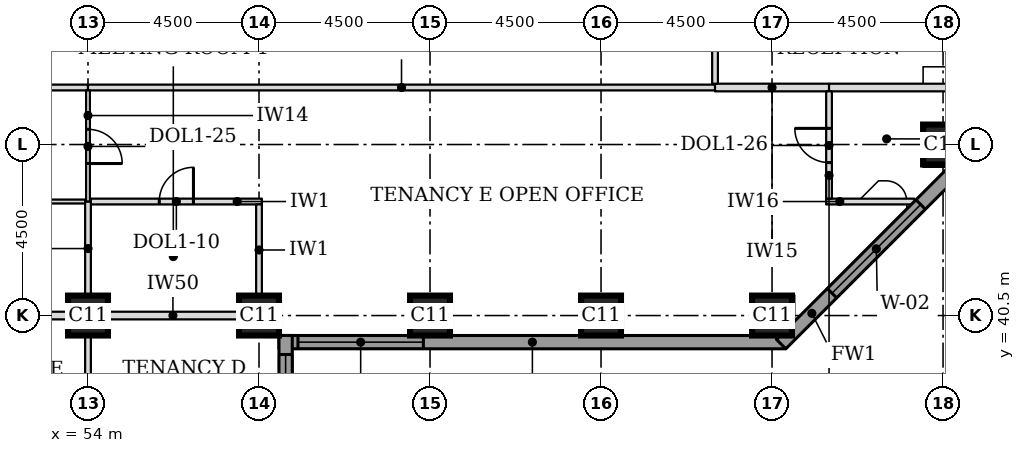
"""IFC4 building model, lengths in metres.
Left out: names, types, materials, properties, quantities, classifications, styles, units other than length and angle.
Written with IfcOpenShell. Run it as: python <this file> out.ifc"""

import sys

from ifc_helpers import new_model, si_unit, direction, frame, frame_2d, origin, origin_2d, place, context, subcontext, project, spatial, rectangle, extrude, element, fill, save


model = new_model("IFC4")
c1 = context("Model", 3, precision=1e-05, world=origin(), true_north=direction((0.0, 1.0)))
c2 = subcontext(c1, "Body", "Model", "MODEL_VIEW")
j1 = project(units=[si_unit("LENGTHUNIT", "METRE"), si_unit("PLANEANGLEUNIT", "RADIAN")], contexts=[c1])
p1 = place(None, origin())
s1 = spatial("IfcSite", under=j1, at=p1, CompositionType="ELEMENT")
p2 = place(p1, origin())
s2 = spatial("IfcBuilding", under=s1, at=p2, CompositionType="ELEMENT")
p3 = place(p2, frame((0.0, 0.0, 78.9)))
s3 = spatial("IfcBuildingStorey", under=s2, at=p3, CompositionType="ELEMENT", Elevation=78.9)
for number, where, z_axis, x_axis in (
    (1, (54.0, 40.5, 0.0), (0.0, 0.0, 1.0), (1.0, 0.0, 0.0)),
    (2, (58.5, 40.5, 0.0), (0.0, 0.0, 1.0), (1.0, 0.0, 0.0)),
    (3, (63.0, 40.5, 0.0), (0.0, 0.0, 1.0), (1.0, 0.0, 0.0)),
    (4, (67.5, 40.5, 0.0), (0.0, 0.0, 1.0), (1.0, 0.0, 0.0)),
    (5, (72.0, 40.5, 0.0), (0.0, 0.0, 1.0), (1.0, 0.0, 0.0)),
    (6, (76.5, 45.0, 0.0), (0.0, 0.0, 1.0), (1.0, 0.0, 0.0)),
):
    element("IfcColumn", number, at=place(p3, frame(where, z_axis=z_axis, x_axis=x_axis)), inside=s3, PredefinedType="COLUMN", context=c2, shape_type="SweptSolid", body=[
        extrude(rectangle(XDim=1.05, YDim=1.05, at=origin_2d()), origin(), (0.0, 0.0, 1.0), 3.7),
    ])
p4 = place(p3, frame((59.025, 39.8, 0.0), z_axis=(0.0, 0.0, 1.0), x_axis=(1.0, 0.0, 0.0)))
e7 = element("IfcWall", 7, at=p4, inside=s3, PredefinedType="STANDARD", context=c2, shape_type="SweptSolid", body=[
    extrude(rectangle(XDim=13.337, YDim=0.35, at=frame_2d((6.669, 0.0))), origin(), (0.0, 0.0, 1.0), 3.525),
])
p5 = place(p4, frame((0.5, 0.0, 0.9)))
e8 = element("IfcOpeningElement", 8, at=p5, cuts=e7, PredefinedType="OPENING", context=c2, shape_type="SweptSolid", body=[
    extrude(rectangle(XDim=3.3, YDim=1.9, at=frame_2d((1.65, 0.95))), frame((0.0, 0.185, 0.0), z_axis=(0.0, -1.0, 0.0), x_axis=(1.0, 0.0, 0.0)), (0.0, 0.0, 1.0), 0.37),
])
p6 = place(p3, frame((72.239, 39.749, 0.0), z_axis=(0.0, 0.0, 1.0), x_axis=(0.707106781187, 0.707106781187, 0.0)))
e9 = element("IfcWall", 9, at=p6, inside=s3, PredefinedType="STANDARD", context=c2, shape_type="SweptSolid", body=[
    extrude(rectangle(XDim=7.089, YDim=0.35, at=frame_2d((3.544, 0.0))), origin(), (0.0, 0.0, 1.0), 3.525),
])
p7 = place(p6, frame((1.894, 0.0, 0.9)))
e10 = element("IfcOpeningElement", 10, at=p7, cuts=e9, PredefinedType="OPENING", context=c2, shape_type="SweptSolid", body=[
    extrude(rectangle(XDim=3.3, YDim=1.9, at=frame_2d((1.65, 0.95))), frame((0.0, 0.185, 0.0), z_axis=(0.0, -1.0, 0.0), x_axis=(1.0, 0.0, 0.0)), (0.0, 0.0, 1.0), 0.37),
])
p8 = place(p3, frame((59.2, 22.138, 0.0), z_axis=(0.0, 0.0, 1.0), x_axis=(0.0, 1.0, 0.0)))
e11 = element("IfcWall", 11, at=p8, inside=s3, PredefinedType="STANDARD", context=c2, shape_type="SweptSolid", body=[
    extrude(rectangle(XDim=17.837, YDim=0.35, at=frame_2d((8.919, 0.0))), origin(), (0.0, 0.0, 1.0), 3.525),
])
p9 = place(p8, frame((5.462, 0.0, 0.9)))
e12 = element("IfcOpeningElement", 12, at=p9, cuts=e11, PredefinedType="OPENING", context=c2, shape_type="SweptSolid", body=[
    extrude(rectangle(XDim=3.3, YDim=1.9, at=frame_2d((1.65, 0.95))), frame((0.0, 0.185, 0.0), z_axis=(0.0, -1.0, 0.0), x_axis=(1.0, 0.0, 0.0)), (0.0, 0.0, 1.0), 0.37),
])
p10 = place(p8, frame((14.037, 0.0, 0.9)))
e13 = element("IfcOpeningElement", 13, at=p10, cuts=e11, PredefinedType="OPENING", context=c2, shape_type="SweptSolid", body=[
    extrude(rectangle(XDim=3.3, YDim=1.9, at=frame_2d((1.65, 0.95))), frame((0.0, 0.185, 0.0), z_axis=(0.0, -1.0, 0.0), x_axis=(1.0, 0.0, 0.0)), (0.0, 0.0, 1.0), 0.37),
])
p11 = place(p3, frame((50.015, 40.5, 0.0), z_axis=(0.0, 0.0, 1.0), x_axis=(1.0, 0.0, 0.0)))
e14 = element("IfcWall", 14, at=p11, inside=s3, PredefinedType="PARTITIONING", context=c2, shape_type="SweptSolid", body=[
    extrude(rectangle(XDim=3.46, YDim=0.2, at=frame_2d((1.73, 0.0))), origin(), (0.0, 0.0, 1.0), 2.8),
])
p12 = place(p3, frame((54.495, 40.5, 0.0), z_axis=(0.0, 0.0, 1.0), x_axis=(1.0, 0.0, 0.0)))
e15 = element("IfcWall", 15, at=p12, inside=s3, PredefinedType="PARTITIONING", context=c2, shape_type="SweptSolid", body=[
    extrude(rectangle(XDim=3.48, YDim=0.2, at=frame_2d((1.74, 0.0))), origin(), (0.0, 0.0, 1.0), 2.8),
])
p13 = place(p3, frame((49.575, 43.5, 0.0), z_axis=(0.0, 0.0, 1.0), x_axis=(1.0, 0.0, 0.0)))
e16 = element("IfcWall", 16, at=p13, inside=s3, PredefinedType="PARTITIONING", context=c2, shape_type="SweptSolid", body=[
    extrude(rectangle(XDim=4.35, YDim=0.1, at=frame_2d((2.175, 0.0))), origin(), (0.0, 0.0, 1.0), 3.55),
])
p14 = place(p13, frame((1.7, 0.0, 0.0)))
e17 = element("IfcOpeningElement", 17, at=p14, cuts=e16, PredefinedType="OPENING", context=c2, shape_type="SweptSolid", body=[
    extrude(rectangle(XDim=0.9, YDim=2.1, at=frame_2d((0.45, 1.05))), frame((0.0, 0.06, 0.0), z_axis=(0.0, -1.0, 0.0), x_axis=(1.0, 0.0, 0.0)), (0.0, 0.0, 1.0), 0.12),
])
p15 = place(p3, frame((54.075, 43.5, 0.0), z_axis=(0.0, 0.0, 1.0), x_axis=(1.0, 0.0, 0.0)))
e18 = element("IfcWall", 18, at=p15, inside=s3, PredefinedType="PARTITIONING", context=c2, shape_type="SweptSolid", body=[
    extrude(rectangle(XDim=4.5, YDim=0.15, at=frame_2d((2.25, 0.0))), origin(), (0.0, 0.0, 1.0), 3.55),
])
p16 = place(p15, frame((1.8, 0.0, 0.0)))
e19 = element("IfcOpeningElement", 19, at=p16, cuts=e18, PredefinedType="OPENING", context=c2, shape_type="SweptSolid", body=[
    extrude(rectangle(XDim=0.9, YDim=2.1, at=frame_2d((0.45, 1.05))), frame((0.0, 0.085, 0.0), z_axis=(0.0, -1.0, 0.0), x_axis=(1.0, 0.0, 0.0)), (0.0, 0.0, 1.0), 0.17),
])
p17 = place(p3, frame((73.425, 43.5, 0.0), z_axis=(0.0, 0.0, 1.0), x_axis=(1.0, 0.0, 0.0)))
e20 = element("IfcWall", 20, at=p17, inside=s3, PredefinedType="PARTITIONING", context=c2, shape_type="SweptSolid", body=[
    extrude(rectangle(XDim=2.317, YDim=0.15, at=frame_2d((1.159, 0.0))), origin(), (0.0, 0.0, 1.0), 3.55),
])
p18 = place(p3, frame((49.425, 46.5, 0.0), z_axis=(0.0, 0.0, 1.0), x_axis=(1.0, 0.0, 0.0)))
e21 = element("IfcWall", 21, at=p18, inside=s3, PredefinedType="PARTITIONING", context=c2, shape_type="SweptSolid", body=[
    extrude(rectangle(XDim=4.575, YDim=0.15, at=frame_2d((2.288, 0.0))), origin(), (0.0, 0.0, 1.0), 3.55),
])
p19 = place(p18, frame((1.8, 0.0, 0.0)))
e22 = element("IfcOpeningElement", 22, at=p19, cuts=e21, PredefinedType="OPENING", context=c2, shape_type="SweptSolid", body=[
    extrude(rectangle(XDim=1.0, YDim=2.1, at=frame_2d((0.5, 1.05))), frame((0.0, 0.085, 0.0), z_axis=(0.0, -1.0, 0.0), x_axis=(1.0, 0.0, 0.0)), (0.0, 0.0, 1.0), 0.17),
])
p20 = place(p3, frame((54.0, 46.5, 0.0), z_axis=(0.0, 0.0, 1.0), x_axis=(1.0, 0.0, 0.0)))
e23 = element("IfcWall", 23, at=p20, inside=s3, PredefinedType="PARTITIONING", context=c2, shape_type="SweptSolid", body=[
    extrude(rectangle(XDim=16.5, YDim=0.15, at=frame_2d((8.25, 0.0))), origin(), (0.0, 0.0, 1.0), 3.55),
])
p21 = place(p3, frame((70.5, 46.5, 0.0), z_axis=(0.0, 0.0, 1.0), x_axis=(1.0, 0.0, 0.0)))
e24 = element("IfcWall", 24, at=p21, inside=s3, PredefinedType="PARTITIONING", context=c2, shape_type="SweptSolid", body=[
    extrude(rectangle(XDim=3.0, YDim=0.2, at=frame_2d((1.5, 0.0))), origin(), (0.0, 0.0, 1.0), 3.55),
])
p22 = place(p3, frame((73.5, 46.5, 0.0), z_axis=(0.0, 0.0, 1.0), x_axis=(1.0, 0.0, 0.0)))
e25 = element("IfcWall", 25, at=p22, inside=s3, PredefinedType="PARTITIONING", context=c2, shape_type="SweptSolid", body=[
    extrude(rectangle(XDim=3.525, YDim=0.2, at=frame_2d((1.762, 0.0))), origin(), (0.0, 0.0, 1.0), 3.55),
])
p23 = place(p3, frame((54.0, 36.075, 0.0), z_axis=(0.0, 0.0, 1.0), x_axis=(0.0, 1.0, 0.0)))
e26 = element("IfcWall", 26, at=p23, inside=s3, PredefinedType="PARTITIONING", context=c2, shape_type="SweptSolid", body=[
    extrude(rectangle(XDim=3.9, YDim=0.15, at=frame_2d((1.95, 0.0))), origin(), (0.0, 0.0, 1.0), 3.55),
])
p24 = place(p3, frame((54.0, 41.025, 0.0), z_axis=(0.0, 0.0, 1.0), x_axis=(0.0, 1.0, 0.0)))
e27 = element("IfcWall", 27, at=p24, inside=s3, PredefinedType="PARTITIONING", context=c2, shape_type="SweptSolid", body=[
    extrude(rectangle(XDim=2.475, YDim=0.15, at=frame_2d((1.238, 0.0))), origin(), (0.0, 0.0, 1.0), 3.55),
])
p25 = place(p3, frame((58.5, 41.025, 0.0), z_axis=(0.0, 0.0, 1.0), x_axis=(0.0, 1.0, 0.0)))
e28 = element("IfcWall", 28, at=p25, inside=s3, PredefinedType="PARTITIONING", context=c2, shape_type="SweptSolid", body=[
    extrude(rectangle(XDim=2.4, YDim=0.15, at=frame_2d((1.2, 0.0))), origin(), (0.0, 0.0, 1.0), 3.55),
])
p26 = place(p3, frame((54.0, 43.5, 0.0), z_axis=(0.0, 0.0, 1.0), x_axis=(0.0, 1.0, 0.0)))
e29 = element("IfcWall", 29, at=p26, inside=s3, PredefinedType="PARTITIONING", context=c2, shape_type="SweptSolid", body=[
    extrude(rectangle(XDim=2.925, YDim=0.1, at=frame_2d((1.462, 0.0))), origin(), (0.0, 0.0, 1.0), 3.55),
])
p27 = place(p26, frame((1.0, 0.0, 0.0)))
e30 = element("IfcOpeningElement", 30, at=p27, cuts=e29, PredefinedType="OPENING", context=c2, shape_type="SweptSolid", body=[
    extrude(rectangle(XDim=0.9, YDim=2.1, at=frame_2d((0.45, 1.05))), frame((0.0, 0.06, 0.0), z_axis=(0.0, -1.0, 0.0), x_axis=(1.0, 0.0, 0.0)), (0.0, 0.0, 1.0), 0.12),
])
p28 = place(p3, frame((73.5, 43.575, 0.0), z_axis=(0.0, 0.0, 1.0), x_axis=(0.0, 1.0, 0.0)))
e31 = element("IfcWall", 31, at=p28, inside=s3, PredefinedType="PARTITIONING", context=c2, shape_type="SweptSolid", body=[
    extrude(rectangle(XDim=2.825, YDim=0.15, at=frame_2d((1.413, 0.0))), origin(), (0.0, 0.0, 1.0), 3.55),
])
p29 = place(p28, frame((0.95, 0.0, 0.0)))
e32 = element("IfcOpeningElement", 32, at=p29, cuts=e31, PredefinedType="OPENING", context=c2, shape_type="SweptSolid", body=[
    extrude(rectangle(XDim=0.9, YDim=2.1, at=frame_2d((0.45, 1.05))), frame((0.0, 0.085, 0.0), z_axis=(0.0, -1.0, 0.0), x_axis=(1.0, 0.0, 0.0)), (0.0, 0.0, 1.0), 0.17),
])
p30 = place(p3, frame((70.5, 46.6, 0.0), z_axis=(0.0, 0.0, 1.0), x_axis=(0.0, 1.0, 0.0)))
e33 = element("IfcWall", 33, at=p30, inside=s3, PredefinedType="PARTITIONING", context=c2, shape_type="SweptSolid", body=[
    extrude(rectangle(XDim=4.4, YDim=0.15, at=frame_2d((2.2, 0.0))), origin(), (0.0, 0.0, 1.0), 3.55),
])
p31 = place(p30, frame((1.7, 0.0, 0.0)))
e34 = element("IfcOpeningElement", 34, at=p31, cuts=e33, PredefinedType="OPENING", context=c2, shape_type="SweptSolid", body=[
    extrude(rectangle(XDim=1.0, YDim=2.1, at=frame_2d((0.5, 1.05))), frame((0.0, 0.085, 0.0), z_axis=(0.0, -1.0, 0.0), x_axis=(1.0, 0.0, 0.0)), (0.0, 0.0, 1.0), 0.17),
])
p32 = place(p5, origin())
e35 = element("IfcWindow", 35, at=p32, inside=s3, PartitioningType="SINGLE_PANEL", PredefinedType="WINDOW", context=c2, shape_type="SweptSolid", body=[
    extrude(rectangle(XDim=3.3, YDim=1.9, at=frame_2d((1.65, 0.95))), frame((0.0, 0.085, 0.0), z_axis=(0.0, -1.0, 0.0), x_axis=(1.0, 0.0, 0.0)), (0.0, 0.0, 1.0), 0.06),
])
fill(e8, e35)
p33 = place(p7, origin())
e36 = element("IfcWindow", 36, at=p33, inside=s3, PartitioningType="SINGLE_PANEL", PredefinedType="WINDOW", context=c2, shape_type="SweptSolid", body=[
    extrude(rectangle(XDim=3.3, YDim=1.9, at=frame_2d((1.65, 0.95))), frame((0.0, 0.085, 0.0), z_axis=(0.0, -1.0, 0.0), x_axis=(1.0, 0.0, 0.0)), (0.0, 0.0, 1.0), 0.06),
])
fill(e10, e36)
p34 = place(p10, origin())
e37 = element("IfcWindow", 37, at=p34, inside=s3, PartitioningType="SINGLE_PANEL", PredefinedType="WINDOW", context=c2, shape_type="SweptSolid", body=[
    extrude(rectangle(XDim=3.3, YDim=1.9, at=frame_2d((1.65, 0.95))), frame((0.0, 0.085, 0.0), z_axis=(0.0, -1.0, 0.0), x_axis=(1.0, 0.0, 0.0)), (0.0, 0.0, 1.0), 0.06),
])
fill(e13, e37)
p35 = place(p27, frame((0.9, 0.0, 0.0), z_axis=(0.0, 0.0, 1.0), x_axis=(-1.0, 0.0, 0.0)))
e38 = element("IfcDoor", 38, at=p35, inside=s3, OperationType="SINGLE_SWING_RIGHT", PredefinedType="DOOR", context=c2, shape_type="SweptSolid", body=[
    extrude(rectangle(XDim=0.9, YDim=2.1, at=frame_2d((0.45, 1.05))), frame((0.0, 0.025, 0.0), z_axis=(0.0, -1.0, 0.0), x_axis=(1.0, 0.0, 0.0)), (0.0, 0.0, 1.0), 0.05),
])
fill(e30, e38)
p36 = place(p29, origin())
e39 = element("IfcDoor", 39, at=p36, inside=s3, OperationType="SINGLE_SWING_RIGHT", PredefinedType="DOOR", context=c2, shape_type="SweptSolid", body=[
    extrude(rectangle(XDim=0.9, YDim=2.1, at=frame_2d((0.45, 1.05))), frame((0.0, 0.025, 0.0), z_axis=(0.0, -1.0, 0.0), x_axis=(1.0, 0.0, 0.0)), (0.0, 0.0, 1.0), 0.05),
])
fill(e32, e39)
p37 = place(p16, origin())
e40 = element("IfcDoor", 40, at=p37, inside=s3, OperationType="SINGLE_SWING_RIGHT", PredefinedType="DOOR", context=c2, shape_type="SweptSolid", body=[
    extrude(rectangle(XDim=0.9, YDim=2.1, at=frame_2d((0.45, 1.05))), frame((0.0, 0.025, 0.0), z_axis=(0.0, -1.0, 0.0), x_axis=(1.0, 0.0, 0.0)), (0.0, 0.0, 1.0), 0.05),
])
fill(e19, e40)
save(model, sys.argv[1])
